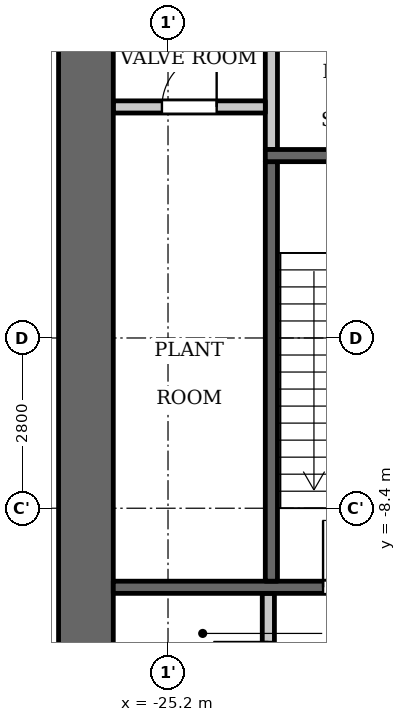
"""IFC4 building model, lengths in metres.
Left out: names, types, materials, properties, quantities, classifications, styles, units other than length and angle.
Written with IfcOpenShell. Run it as: python <this file> out.ifc"""

import sys

from ifc_helpers import new_model, si_unit, direction, frame, frame_2d, origin, place, context, subcontext, project, spatial, rectangle, extrude, element, fill, save


model = new_model("IFC4")
c1 = context("Model", 3, precision=1e-05, world=origin(), true_north=direction((0.0, 1.0)))
c2 = subcontext(c1, "Body", "Model", "MODEL_VIEW")
j1 = project(units=[si_unit("LENGTHUNIT", "METRE"), si_unit("PLANEANGLEUNIT", "RADIAN")], contexts=[c1])
p1 = place(None, origin())
s1 = spatial("IfcSite", under=j1, at=p1, CompositionType="ELEMENT")
p2 = place(p1, origin())
s2 = spatial("IfcBuilding", under=s1, at=p2, CompositionType="ELEMENT")
p3 = place(p2, frame((0.0, 0.0, 125.3)))
s3 = spatial("IfcBuildingStorey", under=s2, at=p3, CompositionType="ELEMENT", Elevation=125.3)
p4 = place(p3, frame((-23.5, -2.5, 0.0), z_axis=(0.0, 0.0, 1.0), x_axis=(0.0, 1.0, 0.0)))
e1 = element("IfcWall", 1, at=p4, inside=s3, PredefinedType="PARTITIONING", context=c2, shape_type="SweptSolid", body=[
    extrude(rectangle(XDim=2.65, YDim=0.2, at=frame_2d((1.325, 0.0))), origin(), (0.0, 0.0, 1.0), 4.95),
])
p5 = place(p3, frame((-26.55, -12.3, 0.0), z_axis=(0.0, 0.0, 1.0), x_axis=(0.0, 1.0, 0.0)))
e2 = element("IfcWall", 2, at=p5, inside=s3, PredefinedType="SHEAR", context=c2, shape_type="SweptSolid", body=[
    extrude(rectangle(XDim=24.6, YDim=0.9, at=frame_2d((12.3, 0.0))), origin(), (0.0, 0.0, 1.0), 4.95),
])
p6 = place(p3, frame((-23.55, -12.3, 0.0), z_axis=(0.0, 0.0, 1.0), x_axis=(0.0, 1.0, 0.0)))
e3 = element("IfcWall", 3, at=p6, inside=s3, PredefinedType="PARTITIONING", context=c2, shape_type="SweptSolid", body=[
    extrude(rectangle(XDim=2.5, YDim=0.2, at=frame_2d((1.25, 0.0))), origin(), (0.0, 0.0, 1.0), 4.95),
])
p7 = place(p6, frame((0.8, 0.0, 0.0)))
e4 = element("IfcOpeningElement", 4, at=p7, cuts=e3, PredefinedType="OPENING", context=c2, shape_type="SweptSolid", body=[
    extrude(rectangle(XDim=0.9, YDim=2.1, at=frame_2d((0.45, 1.05))), frame((0.0, 0.11, 0.0), z_axis=(0.0, -1.0, 0.0), x_axis=(1.0, 0.0, 0.0)), (0.0, 0.0, 1.0), 0.22),
])
p8 = place(p3, frame((-23.6, -1.8, 0.0), z_axis=(0.0, 0.0, 1.0), x_axis=(-1.0, 0.0, 0.0)))
e5 = element("IfcWall", 5, at=p8, inside=s3, PredefinedType="PARTITIONING", context=c2, shape_type="SweptSolid", body=[
    extrude(rectangle(XDim=2.5, YDim=0.2, at=frame_2d((1.25, 0.0))), origin(), (0.0, 0.0, 1.0), 4.95),
])
p9 = place(p8, frame((0.8, 0.0, 0.0)))
e6 = element("IfcOpeningElement", 6, at=p9, cuts=e5, PredefinedType="OPENING", context=c2, shape_type="SweptSolid", body=[
    extrude(rectangle(XDim=0.9, YDim=2.1, at=frame_2d((0.45, 1.05))), frame((0.0, 0.11, 0.0), z_axis=(0.0, -1.0, 0.0), x_axis=(1.0, 0.0, 0.0)), (0.0, 0.0, 1.0), 0.22),
])
p10 = place(p3, frame((-17.8, -9.7, 0.0), z_axis=(0.0, 0.0, 1.0), x_axis=(-1.0, 0.0, 0.0)))
e7 = element("IfcWall", 7, at=p10, inside=s3, PredefinedType="SHEAR", context=c2, shape_type="SweptSolid", body=[
    extrude(rectangle(XDim=8.3, YDim=0.2, at=frame_2d((4.15, 0.0))), origin(), (0.0, 0.0, 1.0), 4.95),
])
p11 = place(p10, frame((0.85, 0.0, 0.0)))
e8 = element("IfcOpeningElement", 8, at=p11, cuts=e7, PredefinedType="OPENING", context=c2, shape_type="SweptSolid", body=[
    extrude(rectangle(XDim=1.1, YDim=2.1, at=frame_2d((0.55, 1.05))), frame((0.0, 0.11, 0.0), z_axis=(0.0, -1.0, 0.0), x_axis=(1.0, 0.0, 0.0)), (0.0, 0.0, 1.0), 0.22),
])
p12 = place(p10, frame((3.75, 0.0, 0.0)))
e9 = element("IfcOpeningElement", 9, at=p12, cuts=e7, PredefinedType="OPENING", context=c2, shape_type="SweptSolid", body=[
    extrude(rectangle(XDim=1.1, YDim=2.1, at=frame_2d((0.55, 1.05))), frame((0.0, 0.11, 0.0), z_axis=(0.0, -1.0, 0.0), x_axis=(1.0, 0.0, 0.0)), (0.0, 0.0, 1.0), 0.22),
])
p13 = place(p3, frame((-23.5, -9.6, 0.0), z_axis=(0.0, 0.0, 1.0), x_axis=(0.0, 1.0, 0.0)))
e10 = element("IfcWall", 10, at=p13, inside=s3, PredefinedType="SHEAR", context=c2, shape_type="SweptSolid", body=[
    extrude(rectangle(XDim=6.9, YDim=0.2, at=frame_2d((3.45, 0.0))), origin(), (0.0, 0.0, 1.0), 4.95),
])
p14 = place(p3, frame((-20.8, -2.6, 0.0), z_axis=(0.0, 0.0, 1.0), x_axis=(-1.0, 0.0, 0.0)))
e11 = element("IfcWall", 11, at=p14, inside=s3, PredefinedType="SHEAR", context=c2, shape_type="SweptSolid", body=[
    extrude(rectangle(XDim=2.8, YDim=0.2, at=frame_2d((1.4, 0.0))), origin(), (0.0, 0.0, 1.0), 4.95),
])
p15 = place(p12, origin())
e12 = element("IfcDoor", 12, at=p15, inside=s3, OperationType="SINGLE_SWING_RIGHT", PredefinedType="DOOR", context=c2, shape_type="SweptSolid", body=[
    extrude(rectangle(XDim=1.1, YDim=2.1, at=frame_2d((0.55, 1.05))), frame((0.0, 0.025, 0.0), z_axis=(0.0, -1.0, 0.0), x_axis=(1.0, 0.0, 0.0)), (0.0, 0.0, 1.0), 0.05),
])
fill(e9, e12)
p16 = place(p9, origin())
e13 = element("IfcDoor", 13, at=p16, inside=s3, OperationType="SINGLE_SWING_LEFT", PredefinedType="DOOR", context=c2, shape_type="SweptSolid", body=[
    extrude(rectangle(XDim=0.9, YDim=2.1, at=frame_2d((0.45, 1.05))), frame((0.0, 0.025, 0.0), z_axis=(0.0, -1.0, 0.0), x_axis=(1.0, 0.0, 0.0)), (0.0, 0.0, 1.0), 0.05),
])
fill(e6, e13)
save(model, sys.argv[1])
